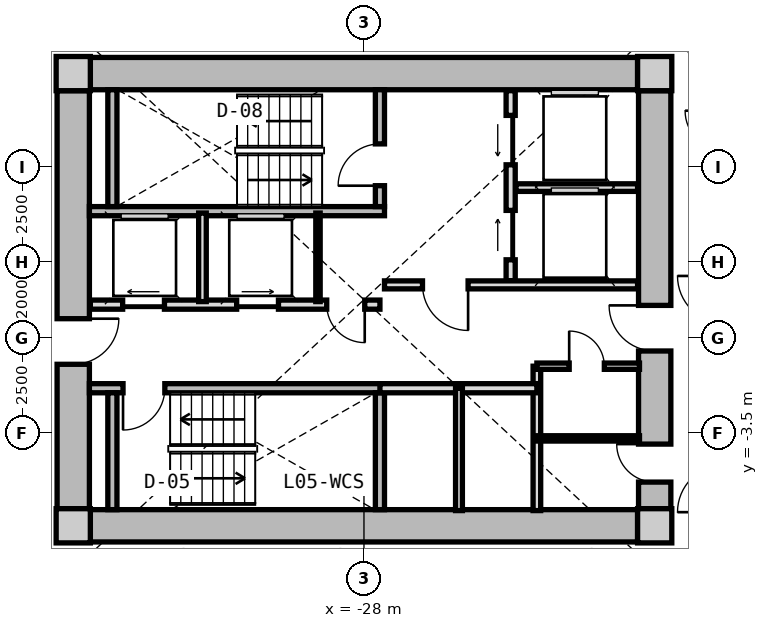
"""IFC4 building model, lengths in metres.
Left out: names, types, materials, properties, quantities, classifications, styles, units other than length and angle.
Written with IfcOpenShell. Run it as: python <this file> out.ifc"""

import sys

from ifc_helpers import new_model, si_unit, direction, frame, frame_2d, origin, origin_2d, place, context, subcontext, project, spatial, rectangle, extrude, source, transform, mapped, element, fill, save


model = new_model("IFC4")
c1 = context("Model", 3, precision=1e-05, world=origin(), true_north=direction((0.0, 1.0)))
c2 = subcontext(c1, "Body", "Model", "MODEL_VIEW")
j1 = project(units=[si_unit("LENGTHUNIT", "METRE"), si_unit("PLANEANGLEUNIT", "RADIAN")], contexts=[c1])
p1 = place(None, origin())
s1 = spatial("IfcSite", under=j1, at=p1, CompositionType="ELEMENT")
p2 = place(p1, origin())
s2 = spatial("IfcBuilding", under=s1, at=p2, CompositionType="ELEMENT")
p3 = place(p2, frame((0.0, 0.0, 21.6)))
s3 = spatial("IfcBuildingStorey", under=s2, at=p3, CompositionType="ELEMENT", Elevation=21.6)
m1 = source(origin(), c2, "Body", "SweptSolid", [
    extrude(rectangle(XDim=0.9, YDim=0.9, at=origin_2d()), origin(), (0.0, 0.0, 1.0), 3.05),
])
for number, where, z_axis, x_axis in (
    (1, (-35.65, -5.95, 0.0), (0.0, 0.0, 1.0), (1.0, 0.0, 0.0)),
    (2, (-20.35, -5.95, 0.0), (0.0, 0.0, 1.0), (1.0, 0.0, 0.0)),
    (3, (-20.35, 5.95, 0.0), (0.0, 0.0, 1.0), (1.0, 0.0, 0.0)),
    (4, (-35.65, 5.95, 0.0), (0.0, 0.0, 1.0), (1.0, 0.0, 0.0)),
):
    element("IfcColumn", number, at=place(p3, frame(where, z_axis=z_axis, x_axis=x_axis)), inside=s3, PredefinedType="COLUMN", context=c2, shape_type="MappedRepresentation", body=[
        mapped(m1, transform((0.0, 0.0, 0.0), x_axis=(1.0, 0.0, 0.0), y_axis=(0.0, 1.0, 0.0), z_axis=(0.0, 0.0, 1.0), scale=1.0)),
    ])
m2 = source(origin(), c2, "Body", "SweptSolid", [
    extrude(rectangle(XDim=14.4, YDim=0.85, at=frame_2d((7.2, 0.0))), origin(), (0.0, 0.0, 1.0), 2.79),
])
for number, where, z_axis, x_axis in (
    (5, (-35.2, 5.95, 0.0), (0.0, 0.0, 1.0), (1.0, 0.0, 0.0)),
    (6, (-20.8, -5.95, 0.0), (0.0, 0.0, 1.0), (-1.0, 0.0, 0.0)),
):
    element("IfcWall", number, at=place(p3, frame(where, z_axis=z_axis, x_axis=x_axis)), inside=s3, PredefinedType="SHEAR", context=c2, shape_type="MappedRepresentation", body=[
        mapped(m2, transform((0.0, 0.0, 0.0), x_axis=(1.0, 0.0, 0.0), y_axis=(0.0, 1.0, 0.0), z_axis=(0.0, 0.0, 1.0), scale=1.0)),
    ])
m3 = source(origin(), c2, "Body", "SweptSolid", [
    extrude(rectangle(XDim=11.0, YDim=0.85, at=frame_2d((5.5, 0.0))), origin(), (0.0, 0.0, 1.0), 2.79),
])
p4 = place(p3, frame((-35.65, -5.5, 0.0), z_axis=(0.0, 0.0, 1.0), x_axis=(0.0, 1.0, 0.0)))
e7 = element("IfcWall", 7, at=p4, inside=s3, PredefinedType="SHEAR", context=c2, shape_type="MappedRepresentation", body=[
    mapped(m3, transform((0.0, 0.0, 0.0), x_axis=(1.0, 0.0, 0.0), y_axis=(0.0, 1.0, 0.0), z_axis=(0.0, 0.0, 1.0), scale=1.0)),
])
p5 = place(p4, frame((3.8, 0.0, 0.0)))
e8 = element("IfcOpeningElement", 8, at=p5, cuts=e7, PredefinedType="OPENING", context=c2, shape_type="SweptSolid", body=[
    extrude(rectangle(XDim=1.2, YDim=2.15, at=frame_2d((0.6, 1.075))), frame((0.0, 0.435, 0.0), z_axis=(0.0, -1.0, 0.0), x_axis=(1.0, 0.0, 0.0)), (0.0, 0.0, 1.0), 0.87),
])
p6 = place(p3, frame((-20.35, 5.5, 0.0), z_axis=(0.0, 0.0, 1.0), x_axis=(0.0, -1.0, 0.0)))
e9 = element("IfcWall", 9, at=p6, inside=s3, PredefinedType="SHEAR", context=c2, shape_type="MappedRepresentation", body=[
    mapped(m3, transform((0.0, 0.0, 0.0), x_axis=(1.0, 0.0, 0.0), y_axis=(0.0, 1.0, 0.0), z_axis=(0.0, 0.0, 1.0), scale=1.0)),
])
p7 = place(p6, frame((5.65, 0.0, 0.0)))
e10 = element("IfcOpeningElement", 10, at=p7, cuts=e9, PredefinedType="OPENING", context=c2, shape_type="SweptSolid", body=[
    extrude(rectangle(XDim=1.2, YDim=2.15, at=frame_2d((0.6, 1.075))), frame((0.0, 0.435, 0.0), z_axis=(0.0, -1.0, 0.0), x_axis=(1.0, 0.0, 0.0)), (0.0, 0.0, 1.0), 0.87),
])
p8 = place(p6, frame((9.3, 0.0, 0.0)))
e11 = element("IfcOpeningElement", 11, at=p8, cuts=e9, PredefinedType="OPENING", context=c2, shape_type="SweptSolid", body=[
    extrude(rectangle(XDim=1.0, YDim=2.1, at=frame_2d((0.5, 1.05))), frame((0.0, 0.435, 0.0), z_axis=(0.0, -1.0, 0.0), x_axis=(1.0, 0.0, 0.0)), (0.0, 0.0, 1.0), 0.87),
])
m4 = source(origin(), c2, "Body", "SweptSolid", [
    extrude(rectangle(XDim=7.765, YDim=0.24, at=frame_2d((3.883, 0.0))), origin(), (0.0, 0.0, 1.0), 2.79),
])
p9 = place(p3, frame((-35.225, 2.33, 0.0), z_axis=(0.0, 0.0, 1.0), x_axis=(1.0, 0.0, 0.0)))
e12 = element("IfcWall", 12, at=p9, inside=s3, PredefinedType="PARTITIONING", context=c2, shape_type="MappedRepresentation", body=[
    mapped(m4, transform((0.0, 0.0, 0.0), x_axis=(1.0, 0.0, 0.0), y_axis=(0.0, 1.0, 0.0), z_axis=(0.0, 0.0, 1.0), scale=1.0)),
])
m5 = source(origin(), c2, "Body", "SweptSolid", [
    extrude(rectangle(XDim=3.075, YDim=0.24, at=frame_2d((1.538, 0.0))), origin(), (0.0, 0.0, 1.0), 2.79),
])
p10 = place(p3, frame((-34.62, 2.45, 0.0), z_axis=(0.0, 0.0, 1.0), x_axis=(0.0, 1.0, 0.0)))
e13 = element("IfcWall", 13, at=p10, inside=s3, PredefinedType="PARTITIONING", context=c2, shape_type="MappedRepresentation", body=[
    mapped(m5, transform((0.0, 0.0, 0.0), x_axis=(1.0, 0.0, 0.0), y_axis=(0.0, 1.0, 0.0), z_axis=(0.0, 0.0, 1.0), scale=1.0)),
])
p11 = place(p3, frame((-27.58, 2.45, 0.0), z_axis=(0.0, 0.0, 1.0), x_axis=(0.0, 1.0, 0.0)))
e14 = element("IfcWall", 14, at=p11, inside=s3, PredefinedType="PARTITIONING", context=c2, shape_type="MappedRepresentation", body=[
    mapped(m5, transform((0.0, 0.0, 0.0), x_axis=(1.0, 0.0, 0.0), y_axis=(0.0, 1.0, 0.0), z_axis=(0.0, 0.0, 1.0), scale=1.0)),
])
p12 = place(p11, frame((0.55, 0.0, 0.0)))
e15 = element("IfcOpeningElement", 15, at=p12, cuts=e14, PredefinedType="OPENING", context=c2, shape_type="SweptSolid", body=[
    extrude(rectangle(XDim=1.1, YDim=2.15, at=frame_2d((0.55, 1.075))), frame((0.0, 0.13, 0.0), z_axis=(0.0, -1.0, 0.0), x_axis=(1.0, 0.0, 0.0)), (0.0, 0.0, 1.0), 0.26),
])
p13 = place(p3, frame((-35.225, -2.33, 0.0), z_axis=(0.0, 0.0, 1.0), x_axis=(1.0, 0.0, 0.0)))
e16 = element("IfcWall", 16, at=p13, inside=s3, PredefinedType="PARTITIONING", context=c2, shape_type="MappedRepresentation", body=[
    mapped(m4, transform((0.0, 0.0, 0.0), x_axis=(1.0, 0.0, 0.0), y_axis=(0.0, 1.0, 0.0), z_axis=(0.0, 0.0, 1.0), scale=1.0)),
])
p14 = place(p13, frame((0.885, 0.0, 0.0)))
e17 = element("IfcOpeningElement", 17, at=p14, cuts=e16, PredefinedType="OPENING", context=c2, shape_type="SweptSolid", body=[
    extrude(rectangle(XDim=1.1, YDim=2.15, at=frame_2d((0.55, 1.075))), frame((0.0, 0.13, 0.0), z_axis=(0.0, -1.0, 0.0), x_axis=(1.0, 0.0, 0.0)), (0.0, 0.0, 1.0), 0.26),
])
for number, where, z_axis, x_axis in (
    (18, (-34.62, -5.525, 0.0), (0.0, 0.0, 1.0), (0.0, 1.0, 0.0)),
    (19, (-27.58, -5.525, 0.0), (0.0, 0.0, 1.0), (0.0, 1.0, 0.0)),
):
    element("IfcWall", number, at=place(p3, frame(where, z_axis=z_axis, x_axis=x_axis)), inside=s3, PredefinedType="PARTITIONING", context=c2, shape_type="MappedRepresentation", body=[
        mapped(m5, transform((0.0, 0.0, 0.0), x_axis=(1.0, 0.0, 0.0), y_axis=(0.0, 1.0, 0.0), z_axis=(0.0, 0.0, 1.0), scale=1.0)),
    ])
m6 = source(origin(), c2, "Body", "SweptSolid", [
    extrude(rectangle(XDim=5.0, YDim=0.24, at=frame_2d((2.5, 0.0))), origin(), (0.0, 0.0, 1.0), 2.775),
])
p15 = place(p3, frame((-24.14, 0.5, 0.0), z_axis=(0.0, 0.0, 1.0), x_axis=(0.0, 1.0, 0.0)))
e20 = element("IfcWall", 20, at=p15, inside=s3, PredefinedType="PARTITIONING", context=c2, shape_type="MappedRepresentation", body=[
    mapped(m6, transform((0.0, 0.0, 0.0), x_axis=(1.0, 0.0, 0.0), y_axis=(0.0, 1.0, 0.0), z_axis=(0.0, 0.0, 1.0), scale=1.0)),
])
p16 = place(p15, frame((3.05, 0.0, 0.0)))
e21 = element("IfcOpeningElement", 21, at=p16, cuts=e20, PredefinedType="OPENING", context=c2, shape_type="SweptSolid", body=[
    extrude(rectangle(XDim=1.3, YDim=2.2, at=frame_2d((0.65, 1.1))), frame((0.0, 0.13, 0.0), z_axis=(0.0, -1.0, 0.0), x_axis=(1.0, 0.0, 0.0)), (0.0, 0.0, 1.0), 0.26),
])
p17 = place(p15, frame((0.55, 0.0, 0.0)))
e22 = element("IfcOpeningElement", 22, at=p17, cuts=e20, PredefinedType="OPENING", context=c2, shape_type="SweptSolid", body=[
    extrude(rectangle(XDim=1.3, YDim=2.2, at=frame_2d((0.65, 1.1))), frame((0.0, 0.13, 0.0), z_axis=(0.0, -1.0, 0.0), x_axis=(1.0, 0.0, 0.0)), (0.0, 0.0, 1.0), 0.26),
])
m7 = source(origin(), c2, "Body", "SweptSolid", [
    extrude(rectangle(XDim=3.2, YDim=0.2, at=frame_2d((1.6, 0.0))), origin(), (0.0, 0.0, 1.0), 2.775),
])
p18 = place(p3, frame((-24.0, 2.95, 0.0), z_axis=(0.0, 0.0, 1.0), x_axis=(1.0, 0.0, 0.0)))
e23 = element("IfcWall", 23, at=p18, inside=s3, PredefinedType="PARTITIONING", context=c2, shape_type="MappedRepresentation", body=[
    mapped(m7, transform((0.0, 0.0, 0.0), x_axis=(1.0, 0.0, 0.0), y_axis=(0.0, 1.0, 0.0), z_axis=(0.0, 0.0, 1.0), scale=1.0)),
])
m8 = source(origin(), c2, "Body", "SweptSolid", [
    extrude(rectangle(XDim=6.66, YDim=0.21, at=frame_2d((3.33, 0.0))), origin(), (0.0, 0.0, 1.0), 2.775),
])
p19 = place(p3, frame((-27.46, 0.39, 0.0), z_axis=(0.0, 0.0, 1.0), x_axis=(1.0, 0.0, 0.0)))
e24 = element("IfcWall", 24, at=p19, inside=s3, PredefinedType="PARTITIONING", context=c2, shape_type="MappedRepresentation", body=[
    mapped(m8, transform((0.0, 0.0, 0.0), x_axis=(1.0, 0.0, 0.0), y_axis=(0.0, 1.0, 0.0), z_axis=(0.0, 0.0, 1.0), scale=1.0)),
])
p20 = place(p19, frame((1.0, 0.0, 0.0)))
e25 = element("IfcOpeningElement", 25, at=p20, cuts=e24, PredefinedType="OPENING", context=c2, shape_type="SweptSolid", body=[
    extrude(rectangle(XDim=1.2, YDim=2.15, at=frame_2d((0.6, 1.075))), frame((0.0, 0.115, 0.0), z_axis=(0.0, -1.0, 0.0), x_axis=(1.0, 0.0, 0.0)), (0.0, 0.0, 1.0), 0.23),
])
m9 = source(origin(), c2, "Body", "SweptSolid", [
    extrude(rectangle(XDim=7.62, YDim=0.24, at=frame_2d((3.81, 0.0))), origin(), (0.0, 0.0, 1.0), 2.775),
])
p21 = place(p3, frame((-35.2, -0.13, 0.0), z_axis=(0.0, 0.0, 1.0), x_axis=(1.0, 0.0, 0.0)))
e26 = element("IfcWall", 26, at=p21, inside=s3, PredefinedType="PARTITIONING", context=c2, shape_type="MappedRepresentation", body=[
    mapped(m9, transform((0.0, 0.0, 0.0), x_axis=(1.0, 0.0, 0.0), y_axis=(0.0, 1.0, 0.0), z_axis=(0.0, 0.0, 1.0), scale=1.0)),
])
p22 = place(p21, frame((6.22, 0.0, 0.0)))
e27 = element("IfcOpeningElement", 27, at=p22, cuts=e26, PredefinedType="OPENING", context=c2, shape_type="SweptSolid", body=[
    extrude(rectangle(XDim=1.0, YDim=2.1, at=frame_2d((0.5, 1.05))), frame((0.0, 0.13, 0.0), z_axis=(0.0, -1.0, 0.0), x_axis=(1.0, 0.0, 0.0)), (0.0, 0.0, 1.0), 0.26),
])
p23 = place(p21, frame((0.85, 0.0, 0.0)))
e28 = element("IfcOpeningElement", 28, at=p23, cuts=e26, PredefinedType="OPENING", context=c2, shape_type="SweptSolid", body=[
    extrude(rectangle(XDim=1.1, YDim=2.2, at=frame_2d((0.55, 1.1))), frame((0.0, 0.13, 0.0), z_axis=(0.0, -1.0, 0.0), x_axis=(1.0, 0.0, 0.0)), (0.0, 0.0, 1.0), 0.26),
])
p24 = place(p21, frame((3.85, 0.0, 0.0)))
e29 = element("IfcOpeningElement", 29, at=p24, cuts=e26, PredefinedType="OPENING", context=c2, shape_type="SweptSolid", body=[
    extrude(rectangle(XDim=1.1, YDim=2.2, at=frame_2d((0.55, 1.1))), frame((0.0, 0.13, 0.0), z_axis=(0.0, -1.0, 0.0), x_axis=(1.0, 0.0, 0.0)), (0.0, 0.0, 1.0), 0.26),
])
m10 = source(origin(), c2, "Body", "SweptSolid", [
    extrude(rectangle(XDim=2.33, YDim=0.115, at=frame_2d((1.165, 0.0))), origin(), (0.0, 0.0, 1.0), 2.775),
])
p25 = place(p3, frame((-29.21, -0.05, 0.0), z_axis=(0.0, 0.0, 1.0), x_axis=(0.0, 1.0, 0.0)))
e30 = element("IfcWall", 30, at=p25, inside=s3, PredefinedType="PARTITIONING", context=c2, shape_type="MappedRepresentation", body=[
    mapped(m10, transform((0.0, 0.0, 0.0), x_axis=(1.0, 0.0, 0.0), y_axis=(0.0, 1.0, 0.0), z_axis=(0.0, 0.0, 1.0), scale=1.0)),
])
m11 = source(origin(), c2, "Body", "SweptSolid", [
    extrude(rectangle(XDim=2.33, YDim=0.2, at=frame_2d((1.165, 0.0))), origin(), (0.0, 0.0, 1.0), 2.775),
])
p26 = place(p3, frame((-32.25, -0.05, 0.0), z_axis=(0.0, 0.0, 1.0), x_axis=(0.0, 1.0, 0.0)))
e31 = element("IfcWall", 31, at=p26, inside=s3, PredefinedType="PARTITIONING", context=c2, shape_type="MappedRepresentation", body=[
    mapped(m11, transform((0.0, 0.0, 0.0), x_axis=(1.0, 0.0, 0.0), y_axis=(0.0, 1.0, 0.0), z_axis=(0.0, 0.0, 1.0), scale=1.0)),
])
m12 = source(origin(), c2, "Body", "SweptSolid", [
    extrude(rectangle(XDim=3.8, YDim=0.2, at=frame_2d((1.9, 0.0))), origin(), (0.0, 0.0, 1.0), 2.775),
])
p27 = place(p3, frame((-23.45, -5.55, 0.0), z_axis=(0.0, 0.0, 1.0), x_axis=(0.0, 1.0, 0.0)))
e32 = element("IfcWall", 32, at=p27, inside=s3, PredefinedType="PARTITIONING", context=c2, shape_type="MappedRepresentation", body=[
    mapped(m12, transform((0.0, 0.0, 0.0), x_axis=(1.0, 0.0, 0.0), y_axis=(0.0, 1.0, 0.0), z_axis=(0.0, 0.0, 1.0), scale=1.0)),
])
m13 = source(origin(), c2, "Body", "SweptSolid", [
    extrude(rectangle(XDim=4.13, YDim=0.24, at=frame_2d((2.065, 0.0))), origin(), (0.0, 0.0, 1.0), 2.775),
])
p28 = place(p3, frame((-27.58, -2.33, 0.0), z_axis=(0.0, 0.0, 1.0), x_axis=(1.0, 0.0, 0.0)))
e33 = element("IfcWall", 33, at=p28, inside=s3, PredefinedType="PARTITIONING", context=c2, shape_type="MappedRepresentation", body=[
    mapped(m13, transform((0.0, 0.0, 0.0), x_axis=(1.0, 0.0, 0.0), y_axis=(0.0, 1.0, 0.0), z_axis=(0.0, 0.0, 1.0), scale=1.0)),
])
m14 = source(origin(), c2, "Body", "SweptSolid", [
    extrude(rectangle(XDim=3.22, YDim=0.18, at=frame_2d((1.61, 0.0))), origin(), (0.0, 0.0, 1.0), 2.775),
])
p29 = place(p3, frame((-25.5, -5.55, 0.0), z_axis=(0.0, 0.0, 1.0), x_axis=(0.0, 1.0, 0.0)))
e34 = element("IfcWall", 34, at=p29, inside=s3, PredefinedType="PARTITIONING", context=c2, shape_type="MappedRepresentation", body=[
    mapped(m14, transform((0.0, 0.0, 0.0), x_axis=(1.0, 0.0, 0.0), y_axis=(0.0, 1.0, 0.0), z_axis=(0.0, 0.0, 1.0), scale=1.0)),
])
m15 = source(origin(), c2, "Body", "SweptSolid", [
    extrude(rectangle(XDim=2.7, YDim=0.165, at=frame_2d((1.35, 0.0))), origin(), (0.0, 0.0, 1.0), 2.775),
])
p30 = place(p3, frame((-23.45, -1.75, 0.0), z_axis=(0.0, 0.0, 1.0), x_axis=(1.0, 0.0, 0.0)))
e35 = element("IfcWall", 35, at=p30, inside=s3, PredefinedType="PARTITIONING", context=c2, shape_type="MappedRepresentation", body=[
    mapped(m15, transform((0.0, 0.0, 0.0), x_axis=(1.0, 0.0, 0.0), y_axis=(0.0, 1.0, 0.0), z_axis=(0.0, 0.0, 1.0), scale=1.0)),
])
p31 = place(p30, frame((0.85, 0.0, 0.0)))
e36 = element("IfcOpeningElement", 36, at=p31, cuts=e35, PredefinedType="OPENING", context=c2, shape_type="SweptSolid", body=[
    extrude(rectangle(XDim=0.925, YDim=2.1, at=frame_2d((0.462, 1.05))), frame((0.0, 0.093, 0.0), z_axis=(0.0, -1.0, 0.0), x_axis=(1.0, 0.0, 0.0)), (0.0, 0.0, 1.0), 0.185),
])
m16 = source(origin(), c2, "Body", "SweptSolid", [
    extrude(rectangle(XDim=2.7, YDim=0.14, at=frame_2d((1.35, 0.0))), origin(), (0.0, 0.0, 1.0), 2.775),
])
p32 = place(p3, frame((-23.45, -3.65, 0.0), z_axis=(0.0, 0.0, 1.0), x_axis=(1.0, 0.0, 0.0)))
e37 = element("IfcWall", 37, at=p32, inside=s3, PredefinedType="PARTITIONING", context=c2, shape_type="MappedRepresentation", body=[
    mapped(m16, transform((0.0, 0.0, 0.0), x_axis=(1.0, 0.0, 0.0), y_axis=(0.0, 1.0, 0.0), z_axis=(0.0, 0.0, 1.0), scale=1.0)),
])
m17 = source(origin(), c2, "Body", "SweptSolid", [
    extrude(rectangle(XDim=1.1, YDim=2.15, at=frame_2d((0.55, 1.075))), frame((0.0, 0.025, 0.0), z_axis=(0.0, -1.0, 0.0), x_axis=(1.0, 0.0, 0.0)), (0.0, 0.0, 1.0), 0.05),
])
p33 = place(p12, origin())
e38 = element("IfcDoor", 38, at=p33, inside=s3, OperationType="SINGLE_SWING_LEFT", PredefinedType="DOOR", context=c2, shape_type="MappedRepresentation", body=[
    mapped(m17, transform((0.0, 0.0, 0.0), x_axis=(1.0, 0.0, 0.0), y_axis=(0.0, 1.0, 0.0), z_axis=(0.0, 0.0, 1.0), scale=1.0)),
])
fill(e15, e38)
p34 = place(p14, frame((1.1, 0.0, 0.0), z_axis=(0.0, 0.0, 1.0), x_axis=(-1.0, 0.0, 0.0)))
e39 = element("IfcDoor", 39, at=p34, inside=s3, OperationType="SINGLE_SWING_RIGHT", PredefinedType="DOOR", context=c2, shape_type="MappedRepresentation", body=[
    mapped(m17, transform((0.0, 0.0, 0.0), x_axis=(1.0, 0.0, 0.0), y_axis=(0.0, 1.0, 0.0), z_axis=(0.0, 0.0, 1.0), scale=1.0)),
])
fill(e17, e39)
m18 = source(origin(), c2, "Body", "SweptSolid", [
    extrude(rectangle(XDim=1.3, YDim=2.2, at=frame_2d((0.65, 1.1))), frame((0.0, 0.025, 0.0), z_axis=(0.0, -1.0, 0.0), x_axis=(1.0, 0.0, 0.0)), (0.0, 0.0, 1.0), 0.05),
])
p35 = place(p16, origin())
e40 = element("IfcDoor", 40, at=p35, inside=s3, OperationType="SLIDING_TO_LEFT", PredefinedType="DOOR", context=c2, shape_type="MappedRepresentation", body=[
    mapped(m18, transform((0.0, 0.0, 0.0), x_axis=(1.0, 0.0, 0.0), y_axis=(0.0, 1.0, 0.0), z_axis=(0.0, 0.0, 1.0), scale=1.0)),
])
fill(e21, e40)
p36 = place(p17, origin())
e41 = element("IfcDoor", 41, at=p36, inside=s3, OperationType="SLIDING_TO_RIGHT", PredefinedType="DOOR", context=c2, shape_type="MappedRepresentation", body=[
    mapped(m18, transform((0.0, 0.0, 0.0), x_axis=(1.0, 0.0, 0.0), y_axis=(0.0, 1.0, 0.0), z_axis=(0.0, 0.0, 1.0), scale=1.0)),
])
fill(e22, e41)
m19 = source(origin(), c2, "Body", "SweptSolid", [
    extrude(rectangle(XDim=1.2, YDim=2.15, at=frame_2d((0.6, 1.075))), frame((0.0, 0.025, 0.0), z_axis=(0.0, -1.0, 0.0), x_axis=(1.0, 0.0, 0.0)), (0.0, 0.0, 1.0), 0.05),
])
p37 = place(p20, frame((1.2, 0.0, 0.0), z_axis=(0.0, 0.0, 1.0), x_axis=(-1.0, 0.0, 0.0)))
e42 = element("IfcDoor", 42, at=p37, inside=s3, OperationType="SINGLE_SWING_LEFT", PredefinedType="DOOR", context=c2, shape_type="MappedRepresentation", body=[
    mapped(m19, transform((0.0, 0.0, 0.0), x_axis=(1.0, 0.0, 0.0), y_axis=(0.0, 1.0, 0.0), z_axis=(0.0, 0.0, 1.0), scale=1.0)),
])
fill(e25, e42)
p38 = place(p5, frame((1.2, 0.0, 0.0), z_axis=(0.0, 0.0, 1.0), x_axis=(-1.0, 0.0, 0.0)))
e43 = element("IfcDoor", 43, at=p38, inside=s3, OperationType="SINGLE_SWING_LEFT", PredefinedType="DOOR", context=c2, shape_type="MappedRepresentation", body=[
    mapped(m19, transform((0.0, 0.0, 0.0), x_axis=(1.0, 0.0, 0.0), y_axis=(0.0, 1.0, 0.0), z_axis=(0.0, 0.0, 1.0), scale=1.0)),
])
fill(e8, e43)
p39 = place(p7, frame((1.2, 0.0, 0.0), z_axis=(0.0, 0.0, 1.0), x_axis=(-1.0, 0.0, 0.0)))
e44 = element("IfcDoor", 44, at=p39, inside=s3, OperationType="SINGLE_SWING_RIGHT", PredefinedType="DOOR", context=c2, shape_type="MappedRepresentation", body=[
    mapped(m19, transform((0.0, 0.0, 0.0), x_axis=(1.0, 0.0, 0.0), y_axis=(0.0, 1.0, 0.0), z_axis=(0.0, 0.0, 1.0), scale=1.0)),
])
fill(e10, e44)
m20 = source(origin(), c2, "Body", "SweptSolid", [
    extrude(rectangle(XDim=1.0, YDim=2.1, at=frame_2d((0.5, 1.05))), frame((0.0, 0.025, 0.0), z_axis=(0.0, -1.0, 0.0), x_axis=(1.0, 0.0, 0.0)), (0.0, 0.0, 1.0), 0.05),
])
p40 = place(p22, frame((1.0, 0.0, 0.0), z_axis=(0.0, 0.0, 1.0), x_axis=(-1.0, 0.0, 0.0)))
e45 = element("IfcDoor", 45, at=p40, inside=s3, OperationType="SINGLE_SWING_LEFT", PredefinedType="DOOR", context=c2, shape_type="MappedRepresentation", body=[
    mapped(m20, transform((0.0, 0.0, 0.0), x_axis=(1.0, 0.0, 0.0), y_axis=(0.0, 1.0, 0.0), z_axis=(0.0, 0.0, 1.0), scale=1.0)),
])
fill(e27, e45)
m21 = source(origin(), c2, "Body", "SweptSolid", [
    extrude(rectangle(XDim=1.1, YDim=2.2, at=frame_2d((0.55, 1.1))), frame((0.0, 0.025, 0.0), z_axis=(0.0, -1.0, 0.0), x_axis=(1.0, 0.0, 0.0)), (0.0, 0.0, 1.0), 0.05),
])
p41 = place(p23, origin())
e46 = element("IfcDoor", 46, at=p41, inside=s3, OperationType="SLIDING_TO_LEFT", PredefinedType="DOOR", context=c2, shape_type="MappedRepresentation", body=[
    mapped(m21, transform((0.0, 0.0, 0.0), x_axis=(1.0, 0.0, 0.0), y_axis=(0.0, 1.0, 0.0), z_axis=(0.0, 0.0, 1.0), scale=1.0)),
])
fill(e28, e46)
p42 = place(p24, origin())
e47 = element("IfcDoor", 47, at=p42, inside=s3, OperationType="SLIDING_TO_RIGHT", PredefinedType="DOOR", context=c2, shape_type="MappedRepresentation", body=[
    mapped(m21, transform((0.0, 0.0, 0.0), x_axis=(1.0, 0.0, 0.0), y_axis=(0.0, 1.0, 0.0), z_axis=(0.0, 0.0, 1.0), scale=1.0)),
])
fill(e29, e47)
m22 = source(origin(), c2, "Body", "SweptSolid", [
    extrude(rectangle(XDim=0.925, YDim=2.1, at=frame_2d((0.462, 1.05))), frame((0.0, 0.025, 0.0), z_axis=(0.0, -1.0, 0.0), x_axis=(1.0, 0.0, 0.0)), (0.0, 0.0, 1.0), 0.05),
])
p43 = place(p31, origin())
e48 = element("IfcDoor", 48, at=p43, inside=s3, OperationType="SINGLE_SWING_LEFT", PredefinedType="DOOR", context=c2, shape_type="MappedRepresentation", body=[
    mapped(m22, transform((0.0, 0.0, 0.0), x_axis=(1.0, 0.0, 0.0), y_axis=(0.0, 1.0, 0.0), z_axis=(0.0, 0.0, 1.0), scale=1.0)),
])
fill(e36, e48)
p44 = place(p8, frame((1.0, 0.0, 0.0), z_axis=(0.0, 0.0, 1.0), x_axis=(-1.0, 0.0, 0.0)))
e49 = element("IfcDoor", 49, at=p44, inside=s3, OperationType="SINGLE_SWING_RIGHT", PredefinedType="DOOR", context=c2, shape_type="MappedRepresentation", body=[
    mapped(m20, transform((0.0, 0.0, 0.0), x_axis=(1.0, 0.0, 0.0), y_axis=(0.0, 1.0, 0.0), z_axis=(0.0, 0.0, 1.0), scale=1.0)),
])
fill(e11, e49)
save(model, sys.argv[1])
